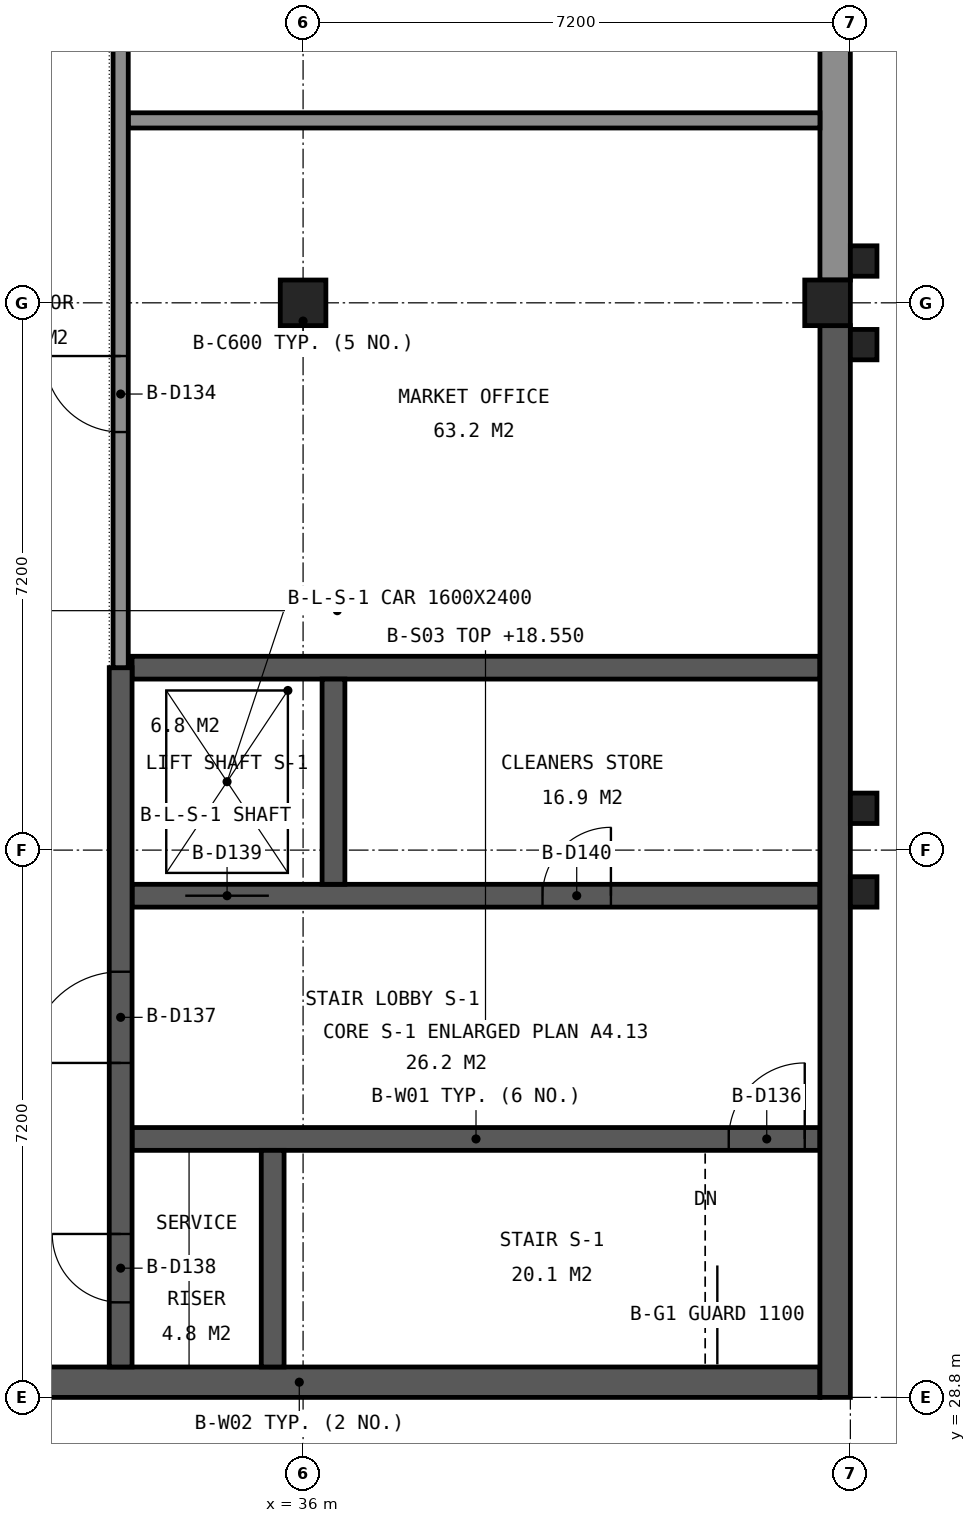
"""IFC4 building model, lengths in metres.
Left out: names, types, materials, properties, quantities, classifications, styles, units other than length and angle.
Written with IfcOpenShell. Run it as: python <this file> out.ifc"""

import sys

from ifc_helpers import new_model, si_unit, direction, frame, frame_2d, origin, origin_2d, place, context, subcontext, project, spatial, polyline, rectangle, outline, extrude, element, fill, save


model = new_model("IFC4")
c1 = context("Model", 3, precision=1e-05, world=origin(), true_north=direction((0.0, 1.0)))
c2 = subcontext(c1, "Body", "Model", "MODEL_VIEW")
j1 = project(units=[si_unit("LENGTHUNIT", "METRE"), si_unit("PLANEANGLEUNIT", "RADIAN")], contexts=[c1])
p1 = place(None, origin())
s1 = spatial("IfcSite", under=j1, at=p1, CompositionType="ELEMENT")
p2 = place(p1, origin())
s2 = spatial("IfcBuilding", under=s1, at=p2, CompositionType="ELEMENT")
p3 = place(p2, frame((0.0, 0.0, 14.4)))
s3 = spatial("IfcBuildingStorey", under=s2, at=p3, CompositionType="ELEMENT", Elevation=14.4)
p4 = place(p3, frame((36.0, 43.2, 0.0), z_axis=(0.0, 0.0, 1.0), x_axis=(1.0, 0.0, 0.0)))
e1 = element("IfcColumn", 1, at=p4, inside=s3, PredefinedType="COLUMN", context=c2, shape_type="SweptSolid", body=[
    extrude(rectangle(XDim=0.6, YDim=0.6, at=origin_2d()), origin(), (0.0, 0.0, 1.0), 4.911),
])
p5 = place(p3, frame((42.9, 43.2, 0.0), z_axis=(0.0, 0.0, 1.0), x_axis=(1.0, 0.0, 0.0)))
e2 = element("IfcColumn", 2, at=p5, inside=s3, PredefinedType="COLUMN", context=c2, shape_type="SweptSolid", body=[
    extrude(rectangle(XDim=0.6, YDim=0.6, at=origin_2d()), origin(), (0.0, 0.0, 1.0), 4.144),
])
p6 = place(p3, frame((29.1, 29.0, 0.0), z_axis=(0.0, 0.0, 1.0), x_axis=(1.0, 0.0, 0.0)))
e3 = element("IfcWall", 3, at=p6, inside=s3, PredefinedType="SHEAR", context=c2, shape_type="SweptSolid", body=[
    extrude(outline(polyline([(0.0, 0.0), (13.7, 0.0), (13.7, 4.155), (3.3, 5.311), (0.0, 4.944), (0.0, 0.0)])), frame((0.0, 0.2, 0.0), z_axis=(0.0, -1.0, 0.0), x_axis=(1.0, 0.0, 0.0)), (0.0, 0.0, 1.0), 0.4),
])
p7 = place(p3, frame((33.75, 32.2, 0.0), z_axis=(0.0, 0.0, 1.0), x_axis=(1.0, 0.0, 0.0)))
e4 = element("IfcWall", 4, at=p7, inside=s3, PredefinedType="SHEAR", context=c2, shape_type="SweptSolid", body=[
    extrude(rectangle(XDim=9.05, YDim=0.3, at=frame_2d((4.525, 0.0))), origin(), (0.0, 0.0, 1.0), 3.9),
])
p8 = place(p7, frame((7.85, 0.0, 0.0)))
e5 = element("IfcOpeningElement", 5, at=p8, cuts=e4, PredefinedType="OPENING", context=c2, shape_type="SweptSolid", body=[
    extrude(rectangle(XDim=1.0, YDim=2.1, at=frame_2d((0.5, 1.05))), frame((0.0, 0.16, 0.0), z_axis=(0.0, -1.0, 0.0), x_axis=(1.0, 0.0, 0.0)), (0.0, 0.0, 1.0), 0.32),
])
p9 = place(p3, frame((33.75, 35.4, 0.0), z_axis=(0.0, 0.0, 1.0), x_axis=(1.0, 0.0, 0.0)))
e6 = element("IfcWall", 6, at=p9, inside=s3, PredefinedType="SHEAR", context=c2, shape_type="SweptSolid", body=[
    extrude(rectangle(XDim=9.05, YDim=0.3, at=frame_2d((4.525, 0.0))), origin(), (0.0, 0.0, 1.0), 3.9),
])
p10 = place(p9, frame((0.7, 0.0, 0.0)))
e7 = element("IfcOpeningElement", 7, at=p10, cuts=e6, PredefinedType="OPENING", context=c2, shape_type="SweptSolid", body=[
    extrude(rectangle(XDim=1.1, YDim=2.1, at=frame_2d((0.55, 1.05))), frame((0.0, 0.16, 0.0), z_axis=(0.0, -1.0, 0.0), x_axis=(1.0, 0.0, 0.0)), (0.0, 0.0, 1.0), 0.32),
])
p11 = place(p9, frame((5.4, 0.0, 0.0)))
e8 = element("IfcOpeningElement", 8, at=p11, cuts=e6, PredefinedType="OPENING", context=c2, shape_type="SweptSolid", body=[
    extrude(rectangle(XDim=0.9, YDim=2.1, at=frame_2d((0.45, 1.05))), frame((0.0, 0.16, 0.0), z_axis=(0.0, -1.0, 0.0), x_axis=(1.0, 0.0, 0.0)), (0.0, 0.0, 1.0), 0.32),
])
p12 = place(p3, frame((33.75, 38.4, 0.0), z_axis=(0.0, 0.0, 1.0), x_axis=(1.0, 0.0, 0.0)))
e9 = element("IfcWall", 9, at=p12, inside=s3, PredefinedType="SHEAR", context=c2, shape_type="SweptSolid", body=[
    extrude(rectangle(XDim=9.05, YDim=0.3, at=frame_2d((4.525, 0.0))), origin(), (0.0, 0.0, 1.0), 3.9),
])
p13 = place(p3, frame((33.6, 29.2, 0.0), z_axis=(0.0, 0.0, 1.0), x_axis=(0.0, 1.0, 0.0)))
e10 = element("IfcWall", 10, at=p13, inside=s3, PredefinedType="SHEAR", context=c2, shape_type="SweptSolid", body=[
    extrude(rectangle(XDim=9.2, YDim=0.3, at=frame_2d((4.6, 0.0))), origin(), (0.0, 0.0, 1.0), 5.161),
])
p14 = place(p13, frame((4.0, 0.0, 0.0)))
e11 = element("IfcOpeningElement", 11, at=p14, cuts=e10, PredefinedType="OPENING", context=c2, shape_type="SweptSolid", body=[
    extrude(rectangle(XDim=1.2, YDim=2.1, at=frame_2d((0.6, 1.05))), frame((0.0, 0.16, 0.0), z_axis=(0.0, -1.0, 0.0), x_axis=(1.0, 0.0, 0.0)), (0.0, 0.0, 1.0), 0.32),
])
p15 = place(p13, frame((0.85, 0.0, 0.0)))
e12 = element("IfcOpeningElement", 12, at=p15, cuts=e10, PredefinedType="OPENING", context=c2, shape_type="SweptSolid", body=[
    extrude(rectangle(XDim=0.9, YDim=2.1, at=frame_2d((0.45, 1.05))), frame((0.0, 0.16, 0.0), z_axis=(0.0, -1.0, 0.0), x_axis=(1.0, 0.0, 0.0)), (0.0, 0.0, 1.0), 0.32),
])
p16 = place(p3, frame((35.6, 29.2, 0.0), z_axis=(0.0, 0.0, 1.0), x_axis=(0.0, 1.0, 0.0)))
e13 = element("IfcWall", 13, at=p16, inside=s3, PredefinedType="SHEAR", context=c2, shape_type="SweptSolid", body=[
    extrude(rectangle(XDim=2.85, YDim=0.3, at=frame_2d((1.425, 0.0))), origin(), (0.0, 0.0, 1.0), 3.9),
])
p17 = place(p3, frame((36.4, 35.55, 0.0), z_axis=(0.0, 0.0, 1.0), x_axis=(0.0, 1.0, 0.0)))
e14 = element("IfcWall", 14, at=p17, inside=s3, PredefinedType="SHEAR", context=c2, shape_type="SweptSolid", body=[
    extrude(rectangle(XDim=2.7, YDim=0.3, at=frame_2d((1.35, 0.0))), origin(), (0.0, 0.0, 1.0), 4.85),
])
p18 = place(p3, frame((43.0, 28.8, 0.0), z_axis=(0.0, 0.0, 1.0), x_axis=(0.0, 1.0, 0.0)))
e15 = element("IfcWall", 15, at=p18, inside=s3, PredefinedType="SHEAR", context=c2, shape_type="SweptSolid", body=[
    extrude(rectangle(XDim=14.1, YDim=0.4, at=frame_2d((7.05, 0.0))), origin(), (0.0, 0.0, 1.0), 4.133),
])
p19 = place(p3, frame((43.0, 43.5, 0.0), z_axis=(0.0, 0.0, 1.0), x_axis=(0.0, 1.0, 0.0)))
e16 = element("IfcWall", 16, at=p19, inside=s3, PredefinedType="SOLIDWALL", context=c2, shape_type="SweptSolid", body=[
    extrude(rectangle(XDim=6.6, YDim=0.4, at=frame_2d((3.3, 0.0))), origin(), (0.0, 0.0, 1.0), 4.133),
])
p20 = place(p19, frame((3.625, 0.0, 1.6)))
e17 = element("IfcOpeningElement", 17, at=p20, cuts=e16, PredefinedType="OPENING", context=c2, shape_type="SweptSolid", body=[
    extrude(rectangle(XDim=0.7, YDim=1.2, at=frame_2d((0.35, 0.6))), frame((0.0, 0.21, 0.0), z_axis=(0.0, -1.0, 0.0), x_axis=(1.0, 0.0, 0.0)), (0.0, 0.0, 1.0), 0.42),
])
p21 = place(p19, frame((4.525, 0.0, 1.6)))
e18 = element("IfcOpeningElement", 18, at=p21, cuts=e16, PredefinedType="OPENING", context=c2, shape_type="SweptSolid", body=[
    extrude(rectangle(XDim=0.7, YDim=1.2, at=frame_2d((0.35, 0.6))), frame((0.0, 0.21, 0.0), z_axis=(0.0, -1.0, 0.0), x_axis=(1.0, 0.0, 0.0)), (0.0, 0.0, 1.0), 0.42),
])
for number, where, z_axis, x_axis in (
    (19, (43.375, 35.45, 0.0), (0.0, 0.0, 1.0), (1.0, 0.0, 0.0)),
    (20, (43.375, 36.55, 0.0), (0.0, 0.0, 1.0), (1.0, 0.0, 0.0)),
    (21, (43.375, 42.65, 0.0), (0.0, 0.0, 1.0), (1.0, 0.0, 0.0)),
    (22, (43.375, 43.75, 0.0), (0.0, 0.0, 1.0), (1.0, 0.0, 0.0)),
):
    element("IfcColumn", number, at=place(p3, frame(where, z_axis=z_axis, x_axis=x_axis)), inside=s3, PredefinedType="COLUMN", context=c2, shape_type="SweptSolid", body=[
        extrude(rectangle(XDim=0.35, YDim=0.4, at=origin_2d()), origin(), (0.0, 0.0, 1.0), 4.1),
    ])
p22 = place(p3, frame((33.7, 45.6, 0.0), z_axis=(0.0, 0.0, 1.0), x_axis=(1.0, 0.0, 0.0)))
e23 = element("IfcWall", 23, at=p22, inside=s3, PredefinedType="PARTITIONING", context=c2, shape_type="SweptSolid", body=[
    extrude(rectangle(XDim=9.1, YDim=0.2, at=frame_2d((4.55, 0.0))), origin(), (0.0, 0.0, 1.0), 4.0),
])
p23 = place(p3, frame((33.6, 38.4, 0.0), z_axis=(0.0, 0.0, 1.0), x_axis=(0.0, 1.0, 0.0)))
e24 = element("IfcWall", 24, at=p23, inside=s3, PredefinedType="PARTITIONING", context=c2, shape_type="SweptSolid", body=[
    extrude(rectangle(XDim=24.0, YDim=0.2, at=frame_2d((12.0, 0.0))), origin(), (0.0, 0.0, 1.0), 4.0),
])
p24 = place(p23, frame((3.1, 0.0, 0.0)))
e25 = element("IfcOpeningElement", 25, at=p24, cuts=e24, PredefinedType="OPENING", context=c2, shape_type="SweptSolid", body=[
    extrude(rectangle(XDim=1.0, YDim=2.1, at=frame_2d((0.5, 1.05))), frame((0.0, 0.11, 0.0), z_axis=(0.0, -1.0, 0.0), x_axis=(1.0, 0.0, 0.0)), (0.0, 0.0, 1.0), 0.22),
])
p25 = place(p23, frame((15.1, 0.0, 0.0)))
e26 = element("IfcOpeningElement", 26, at=p25, cuts=e24, PredefinedType="OPENING", context=c2, shape_type="SweptSolid", body=[
    extrude(rectangle(XDim=1.0, YDim=2.1, at=frame_2d((0.5, 1.05))), frame((0.0, 0.11, 0.0), z_axis=(0.0, -1.0, 0.0), x_axis=(1.0, 0.0, 0.0)), (0.0, 0.0, 1.0), 0.22),
])
p26 = place(p24, origin())
e27 = element("IfcDoor", 27, at=p26, inside=s3, OperationType="SINGLE_SWING_RIGHT", PredefinedType="DOOR", context=c2, shape_type="SweptSolid", body=[
    extrude(rectangle(XDim=1.0, YDim=2.1, at=frame_2d((0.5, 1.05))), frame((0.0, 0.025, 0.0), z_axis=(0.0, -1.0, 0.0), x_axis=(1.0, 0.0, 0.0)), (0.0, 0.0, 1.0), 0.05),
])
fill(e25, e27)
p27 = place(p8, origin())
e28 = element("IfcDoor", 28, at=p27, inside=s3, OperationType="SINGLE_SWING_RIGHT", PredefinedType="DOOR", context=c2, shape_type="SweptSolid", body=[
    extrude(rectangle(XDim=1.0, YDim=2.1, at=frame_2d((0.5, 1.05))), frame((0.0, 0.025, 0.0), z_axis=(0.0, -1.0, 0.0), x_axis=(1.0, 0.0, 0.0)), (0.0, 0.0, 1.0), 0.05),
])
fill(e5, e28)
p28 = place(p14, origin())
e29 = element("IfcDoor", 29, at=p28, inside=s3, OperationType="SINGLE_SWING_LEFT", PredefinedType="DOOR", context=c2, shape_type="SweptSolid", body=[
    extrude(rectangle(XDim=1.2, YDim=2.1, at=frame_2d((0.6, 1.05))), frame((0.0, 0.025, 0.0), z_axis=(0.0, -1.0, 0.0), x_axis=(1.0, 0.0, 0.0)), (0.0, 0.0, 1.0), 0.05),
])
fill(e11, e29)
p29 = place(p15, origin())
e30 = element("IfcDoor", 30, at=p29, inside=s3, OperationType="SINGLE_SWING_RIGHT", PredefinedType="DOOR", context=c2, shape_type="SweptSolid", body=[
    extrude(rectangle(XDim=0.9, YDim=2.1, at=frame_2d((0.45, 1.05))), frame((0.0, 0.025, 0.0), z_axis=(0.0, -1.0, 0.0), x_axis=(1.0, 0.0, 0.0)), (0.0, 0.0, 1.0), 0.05),
])
fill(e12, e30)
p30 = place(p10, origin())
e31 = element("IfcDoor", 31, at=p30, inside=s3, OperationType="SLIDING_TO_LEFT", PredefinedType="DOOR", context=c2, shape_type="SweptSolid", body=[
    extrude(rectangle(XDim=1.1, YDim=2.1, at=frame_2d((0.55, 1.05))), frame((0.0, 0.025, 0.0), z_axis=(0.0, -1.0, 0.0), x_axis=(1.0, 0.0, 0.0)), (0.0, 0.0, 1.0), 0.05),
])
fill(e7, e31)
p31 = place(p11, origin())
e32 = element("IfcDoor", 32, at=p31, inside=s3, OperationType="SINGLE_SWING_RIGHT", PredefinedType="DOOR", context=c2, shape_type="SweptSolid", body=[
    extrude(rectangle(XDim=0.9, YDim=2.1, at=frame_2d((0.45, 1.05))), frame((0.0, 0.025, 0.0), z_axis=(0.0, -1.0, 0.0), x_axis=(1.0, 0.0, 0.0)), (0.0, 0.0, 1.0), 0.05),
])
fill(e8, e32)
save(model, sys.argv[1])
